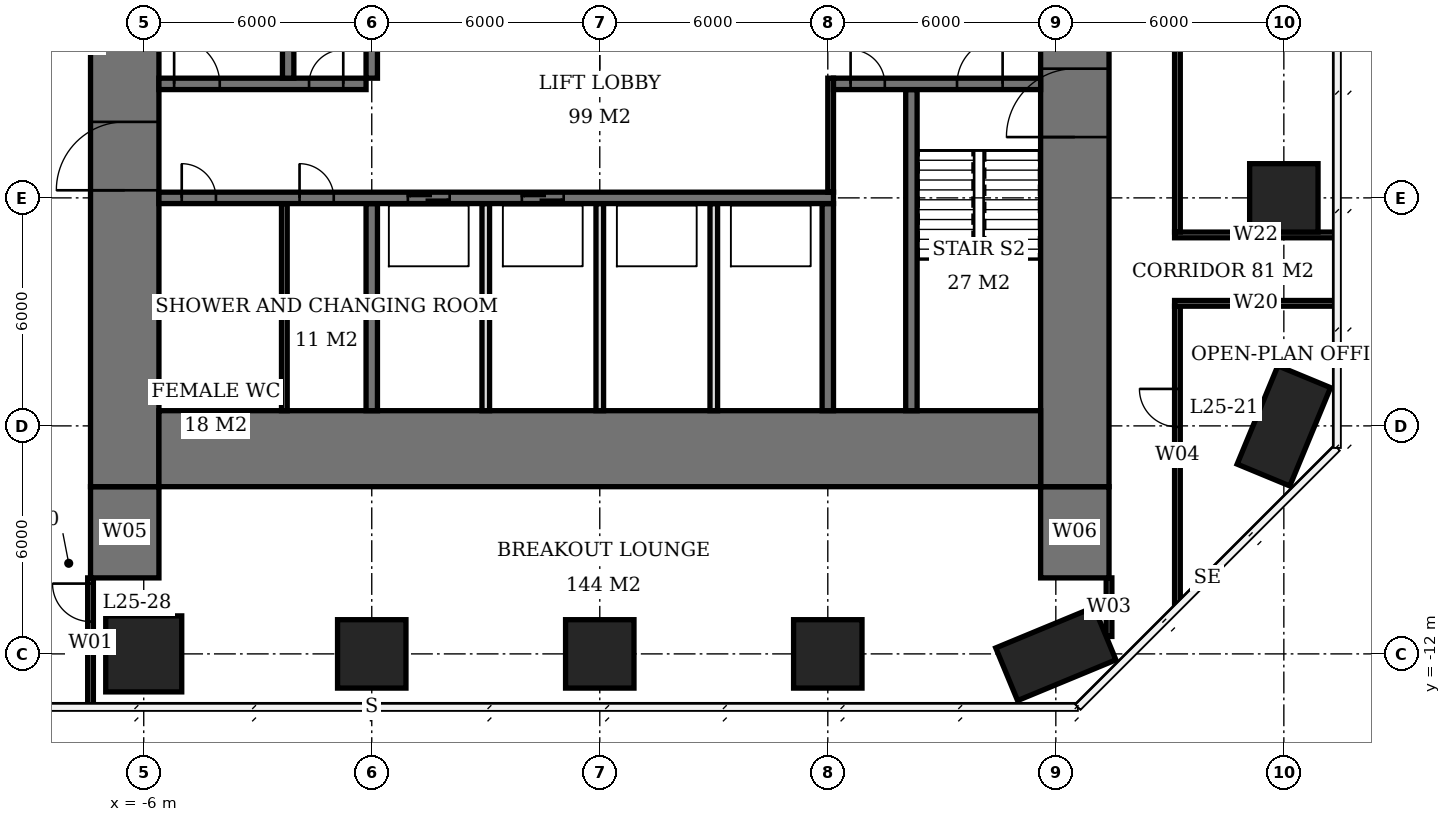
"""IFC4 building model, lengths in metres.
Left out: names, types, materials, properties, quantities, classifications, styles, units other than length and angle.
Written with IfcOpenShell. Run it as: python <this file> out.ifc"""

import sys

from ifc_helpers import new_model, si_unit, direction, frame, frame_2d, origin, origin_2d, place, context, subcontext, project, spatial, rectangle, extrude, element, fill, save


model = new_model("IFC4")
c1 = context("Model", 3, precision=1e-05, world=origin(), true_north=direction((0.0, 1.0)))
c2 = subcontext(c1, "Body", "Model", "MODEL_VIEW")
j1 = project(units=[si_unit("LENGTHUNIT", "METRE"), si_unit("PLANEANGLEUNIT", "RADIAN")], contexts=[c1])
p1 = place(None, origin())
s1 = spatial("IfcSite", under=j1, at=p1, CompositionType="ELEMENT")
p2 = place(p1, origin())
s2 = spatial("IfcBuilding", under=s1, at=p2, CompositionType="ELEMENT")
p3 = place(p2, frame((0.0, 0.0, 105.5)))
s3 = spatial("IfcBuildingStorey", under=s2, at=p3, CompositionType="ELEMENT", Elevation=105.5)
p4 = place(p3, frame((-6.0, -12.0, 0.0), z_axis=(0.0, 0.0, 1.0), x_axis=(1.0, 0.0, 0.0)))
e1 = element("IfcColumn", 1, at=p4, inside=s3, PredefinedType="COLUMN", context=c2, shape_type="SweptSolid", body=[
    extrude(rectangle(XDim=2.0, YDim=2.0, at=origin_2d()), origin(), (0.0, 0.0, 1.0), 3.9),
])
for number, where, z_axis, x_axis in (
    (2, (0.0, -12.0, 0.0), (0.0, 0.0, 1.0), (1.0, 0.0, 0.0)),
    (3, (6.0, -12.0, 0.0), (0.0, 0.0, 1.0), (1.0, 0.0, 0.0)),
    (4, (12.0, -12.0, 0.0), (0.0, 0.0, 1.0), (1.0, 0.0, 0.0)),
):
    element("IfcColumn", number, at=place(p3, frame(where, z_axis=z_axis, x_axis=x_axis)), inside=s3, PredefinedType="COLUMN", context=c2, shape_type="SweptSolid", body=[
        extrude(rectangle(XDim=1.8, YDim=1.8, at=origin_2d()), origin(), (0.0, 0.0, 1.0), 3.9),
    ])
for number, where, z_axis, x_axis in (
    (5, (18.0, -12.0, 0.0), (0.0, 0.0, 1.0), (-0.924, -0.383, 0.0)),
    (6, (24.0, -6.0, 0.0), (0.0, 0.0, 1.0), (-0.383, -0.924, 0.0)),
):
    element("IfcColumn", number, at=place(p3, frame(where, z_axis=z_axis, x_axis=x_axis)), inside=s3, PredefinedType="COLUMN", context=c2, shape_type="SweptSolid", body=[
        extrude(rectangle(XDim=2.8, YDim=1.5, at=origin_2d()), origin(), (0.0, 0.0, 1.0), 3.9),
    ])
p5 = place(p3, frame((24.0, 0.0, 0.0), z_axis=(0.0, 0.0, 1.0), x_axis=(1.0, 0.0, 0.0)))
e7 = element("IfcColumn", 7, at=p5, inside=s3, PredefinedType="COLUMN", context=c2, shape_type="SweptSolid", body=[
    extrude(rectangle(XDim=1.8, YDim=1.8, at=origin_2d()), origin(), (0.0, 0.0, 1.0), 3.9),
])
p6 = place(p3, frame((-5.6, -6.6, 0.0), z_axis=(0.0, 0.0, 1.0), x_axis=(1.0, 0.0, 0.0)))
e8 = element("IfcWall", 8, at=p6, inside=s3, PredefinedType="SHEAR", context=c2, shape_type="SweptSolid", body=[
    extrude(rectangle(XDim=23.2, YDim=2.0, at=frame_2d((11.6, 0.0))), origin(), (0.0, 0.0, 1.0), 3.9),
])
p7 = place(p3, frame((-6.5, -7.6, 0.0), z_axis=(0.0, 0.0, 1.0), x_axis=(0.0, 1.0, 0.0)))
e9 = element("IfcWall", 9, at=p7, inside=s3, PredefinedType="SHEAR", context=c2, shape_type="SweptSolid", body=[
    extrude(rectangle(XDim=21.2, YDim=1.8, at=frame_2d((10.6, 0.0))), origin(), (0.0, 0.0, 1.0), 3.9),
])
p8 = place(p7, frame((7.8, 0.0, 0.0)))
e10 = element("IfcOpeningElement", 10, at=p8, cuts=e9, PredefinedType="OPENING", context=c2, shape_type="SweptSolid", body=[
    extrude(rectangle(XDim=1.8, YDim=2.4, at=frame_2d((0.9, 1.2))), frame((0.0, 0.91, 0.0), z_axis=(0.0, -1.0, 0.0), x_axis=(1.0, 0.0, 0.0)), (0.0, 0.0, 1.0), 1.82),
])
p9 = place(p3, frame((18.5, -7.6, 0.0), z_axis=(0.0, 0.0, 1.0), x_axis=(0.0, 1.0, 0.0)))
e11 = element("IfcWall", 11, at=p9, inside=s3, PredefinedType="SHEAR", context=c2, shape_type="SweptSolid", body=[
    extrude(rectangle(XDim=21.2, YDim=1.8, at=frame_2d((10.6, 0.0))), origin(), (0.0, 0.0, 1.0), 3.9),
])
p10 = place(p9, frame((9.2, 0.0, 0.0)))
e12 = element("IfcOpeningElement", 12, at=p10, cuts=e11, PredefinedType="OPENING", context=c2, shape_type="SweptSolid", body=[
    extrude(rectangle(XDim=1.8, YDim=2.4, at=frame_2d((0.9, 1.2))), frame((0.0, 0.91, 0.0), z_axis=(0.0, -1.0, 0.0), x_axis=(1.0, 0.0, 0.0)), (0.0, 0.0, 1.0), 1.82),
])
for number, where, z_axis, x_axis in (
    (13, (-6.5, -10.0, 0.0), (0.0, 0.0, 1.0), (0.0, 1.0, 0.0)),
    (14, (18.5, -10.0, 0.0), (0.0, 0.0, 1.0), (0.0, 1.0, 0.0)),
):
    element("IfcWall", number, at=place(p3, frame(where, z_axis=z_axis, x_axis=x_axis)), inside=s3, PredefinedType="SHEAR", context=c2, shape_type="SweptSolid", body=[
        extrude(rectangle(XDim=2.4, YDim=1.8, at=frame_2d((1.2, 0.0))), origin(), (0.0, 0.0, 1.0), 3.9),
    ])
p11 = place(p3, frame((-5.6, 0.0, 0.0), z_axis=(0.0, 0.0, 1.0), x_axis=(1.0, 0.0, 0.0)))
e15 = element("IfcWall", 15, at=p11, inside=s3, PredefinedType="SHEAR", context=c2, shape_type="SweptSolid", body=[
    extrude(rectangle(XDim=17.75, YDim=0.3, at=frame_2d((8.875, 0.0))), origin(), (0.0, 0.0, 1.0), 3.9),
])
p12 = place(p11, frame((0.6, 0.0, 0.0)))
e16 = element("IfcOpeningElement", 16, at=p12, cuts=e15, PredefinedType="OPENING", context=c2, shape_type="SweptSolid", body=[
    extrude(rectangle(XDim=0.9, YDim=2.1, at=frame_2d((0.45, 1.05))), frame((0.0, 0.16, 0.0), z_axis=(0.0, -1.0, 0.0), x_axis=(1.0, 0.0, 0.0)), (0.0, 0.0, 1.0), 0.32),
])
p13 = place(p11, frame((3.7, 0.0, 0.0)))
e17 = element("IfcOpeningElement", 17, at=p13, cuts=e15, PredefinedType="OPENING", context=c2, shape_type="SweptSolid", body=[
    extrude(rectangle(XDim=0.9, YDim=2.1, at=frame_2d((0.45, 1.05))), frame((0.0, 0.16, 0.0), z_axis=(0.0, -1.0, 0.0), x_axis=(1.0, 0.0, 0.0)), (0.0, 0.0, 1.0), 0.32),
])
p14 = place(p11, frame((6.55, 0.0, 0.0)))
e18 = element("IfcOpeningElement", 18, at=p14, cuts=e15, PredefinedType="OPENING", context=c2, shape_type="SweptSolid", body=[
    extrude(rectangle(XDim=1.1, YDim=2.1, at=frame_2d((0.55, 1.05))), frame((0.0, 0.16, 0.0), z_axis=(0.0, -1.0, 0.0), x_axis=(1.0, 0.0, 0.0)), (0.0, 0.0, 1.0), 0.32),
])
p15 = place(p11, frame((9.55, 0.0, 0.0)))
e19 = element("IfcOpeningElement", 19, at=p15, cuts=e15, PredefinedType="OPENING", context=c2, shape_type="SweptSolid", body=[
    extrude(rectangle(XDim=1.1, YDim=2.1, at=frame_2d((0.55, 1.05))), frame((0.0, 0.16, 0.0), z_axis=(0.0, -1.0, 0.0), x_axis=(1.0, 0.0, 0.0)), (0.0, 0.0, 1.0), 0.32),
])
p16 = place(p3, frame((-5.6, 3.0, 0.0), z_axis=(0.0, 0.0, 1.0), x_axis=(1.0, 0.0, 0.0)))
e20 = element("IfcWall", 20, at=p16, inside=s3, PredefinedType="SHEAR", context=c2, shape_type="SweptSolid", body=[
    extrude(rectangle(XDim=5.45, YDim=0.3, at=frame_2d((2.725, 0.0))), origin(), (0.0, 0.0, 1.0), 3.9),
])
p17 = place(p16, frame((0.4, 0.0, 0.0)))
e21 = element("IfcOpeningElement", 21, at=p17, cuts=e20, PredefinedType="OPENING", context=c2, shape_type="SweptSolid", body=[
    extrude(rectangle(XDim=1.2, YDim=2.1, at=frame_2d((0.6, 1.05))), frame((0.0, 0.16, 0.0), z_axis=(0.0, -1.0, 0.0), x_axis=(1.0, 0.0, 0.0)), (0.0, 0.0, 1.0), 0.32),
])
p18 = place(p16, frame((3.95, 0.0, 0.0)))
e22 = element("IfcOpeningElement", 22, at=p18, cuts=e20, PredefinedType="OPENING", context=c2, shape_type="SweptSolid", body=[
    extrude(rectangle(XDim=0.9, YDim=2.1, at=frame_2d((0.45, 1.05))), frame((0.0, 0.16, 0.0), z_axis=(0.0, -1.0, 0.0), x_axis=(1.0, 0.0, 0.0)), (0.0, 0.0, 1.0), 0.32),
])
p19 = place(p3, frame((12.15, 3.0, 0.0), z_axis=(0.0, 0.0, 1.0), x_axis=(1.0, 0.0, 0.0)))
e23 = element("IfcWall", 23, at=p19, inside=s3, PredefinedType="SHEAR", context=c2, shape_type="SweptSolid", body=[
    extrude(rectangle(XDim=5.45, YDim=0.3, at=frame_2d((2.725, 0.0))), origin(), (0.0, 0.0, 1.0), 3.9),
])
p20 = place(p19, frame((3.25, 0.0, 0.0)))
e24 = element("IfcOpeningElement", 24, at=p20, cuts=e23, PredefinedType="OPENING", context=c2, shape_type="SweptSolid", body=[
    extrude(rectangle(XDim=1.2, YDim=2.1, at=frame_2d((0.6, 1.05))), frame((0.0, 0.16, 0.0), z_axis=(0.0, -1.0, 0.0), x_axis=(1.0, 0.0, 0.0)), (0.0, 0.0, 1.0), 0.32),
])
p21 = place(p19, frame((0.45, 0.0, 0.0)))
e25 = element("IfcOpeningElement", 25, at=p21, cuts=e23, PredefinedType="OPENING", context=c2, shape_type="SweptSolid", body=[
    extrude(rectangle(XDim=0.9, YDim=2.1, at=frame_2d((0.45, 1.05))), frame((0.0, 0.16, 0.0), z_axis=(0.0, -1.0, 0.0), x_axis=(1.0, 0.0, 0.0)), (0.0, 0.0, 1.0), 0.32),
])
p22 = place(p3, frame((0.0, -5.6, 0.0), z_axis=(0.0, 0.0, 1.0), x_axis=(0.0, 1.0, 0.0)))
e26 = element("IfcWall", 26, at=p22, inside=s3, PredefinedType="SHEAR", context=c2, shape_type="SweptSolid", body=[
    extrude(rectangle(XDim=5.45, YDim=0.3, at=frame_2d((2.725, 0.0))), origin(), (0.0, 0.0, 1.0), 3.9),
])
p23 = place(p3, frame((0.0, 3.15, 0.0), z_axis=(0.0, 0.0, 1.0), x_axis=(0.0, 1.0, 0.0)))
e27 = element("IfcWall", 27, at=p23, inside=s3, PredefinedType="SHEAR", context=c2, shape_type="SweptSolid", body=[
    extrude(rectangle(XDim=8.45, YDim=0.3, at=frame_2d((4.225, 0.0))), origin(), (0.0, 0.0, 1.0), 3.9),
])
p24 = place(p3, frame((12.0, -5.6, 0.0), z_axis=(0.0, 0.0, 1.0), x_axis=(0.0, 1.0, 0.0)))
e28 = element("IfcWall", 28, at=p24, inside=s3, PredefinedType="SHEAR", context=c2, shape_type="SweptSolid", body=[
    extrude(rectangle(XDim=5.45, YDim=0.3, at=frame_2d((2.725, 0.0))), origin(), (0.0, 0.0, 1.0), 3.9),
])
for number, where, z_axis, x_axis in (
    (29, (-2.2, 3.15, 0.0), (0.0, 0.0, 1.0), (0.0, 1.0, 0.0)),
    (30, (14.2, -5.6, 0.0), (0.0, 0.0, 1.0), (0.0, 1.0, 0.0)),
):
    element("IfcWall", number, at=place(p3, frame(where, z_axis=z_axis, x_axis=x_axis)), inside=s3, PredefinedType="SHEAR", context=c2, shape_type="SweptSolid", body=[
        extrude(rectangle(XDim=8.45, YDim=0.3, at=frame_2d((4.225, 0.0))), origin(), (0.0, 0.0, 1.0), 3.9),
    ])
for number, where, z_axis, x_axis in (
    (31, (3.0, -5.6, 0.0), (0.0, 0.0, 1.0), (0.0, 1.0, 0.0)),
    (32, (6.0, -5.6, 0.0), (0.0, 0.0, 1.0), (0.0, 1.0, 0.0)),
    (33, (9.0, -5.6, 0.0), (0.0, 0.0, 1.0), (0.0, 1.0, 0.0)),
):
    element("IfcWall", number, at=place(p3, frame(where, z_axis=z_axis, x_axis=x_axis)), inside=s3, PredefinedType="SOLIDWALL", context=c2, shape_type="SweptSolid", body=[
        extrude(rectangle(XDim=5.45, YDim=0.2, at=frame_2d((2.725, 0.0))), origin(), (0.0, 0.0, 1.0), 3.9),
    ])
p25 = place(p3, frame((-2.3, -5.6, 0.0), z_axis=(0.0, 0.0, 1.0), x_axis=(0.0, 1.0, 0.0)))
e34 = element("IfcWall", 34, at=p25, inside=s3, PredefinedType="PLUMBINGWALL", context=c2, shape_type="SweptSolid", body=[
    extrude(rectangle(XDim=5.45, YDim=0.15, at=frame_2d((2.725, 0.0))), origin(), (0.0, 0.0, 1.0), 3.65),
])
p26 = place(p3, frame((-7.4, -13.4, 0.0), z_axis=(0.0, 0.0, 1.0), x_axis=(0.0, 1.0, 0.0)))
e35 = element("IfcWall", 35, at=p26, inside=s3, PredefinedType="PARTITIONING", context=c2, shape_type="SweptSolid", body=[
    extrude(rectangle(XDim=3.4, YDim=0.15, at=frame_2d((1.7, 0.0))), origin(), (0.0, 0.0, 1.0), 3.65),
])
p27 = place(p26, frame((2.25, 0.0, 0.0)))
e36 = element("IfcOpeningElement", 36, at=p27, cuts=e35, PredefinedType="OPENING", context=c2, shape_type="SweptSolid", body=[
    extrude(rectangle(XDim=1.0, YDim=2.1, at=frame_2d((0.5, 1.05))), frame((0.0, 0.085, 0.0), z_axis=(0.0, -1.0, 0.0), x_axis=(1.0, 0.0, 0.0)), (0.0, 0.0, 1.0), 0.17),
])
p28 = place(p3, frame((19.4, -11.541, 0.0), z_axis=(0.0, 0.0, 1.0), x_axis=(0.0, 1.0, 0.0)))
e37 = element("IfcWall", 37, at=p28, inside=s3, PredefinedType="PARTITIONING", context=c2, shape_type="SweptSolid", body=[
    extrude(rectangle(XDim=1.541, YDim=0.15, at=frame_2d((0.77, 0.0))), origin(), (0.0, 0.0, 1.0), 3.65),
])
p29 = place(p3, frame((21.2, -10.689, 0.0), z_axis=(0.0, 0.0, 1.0), x_axis=(0.0, 1.0, 0.0)))
e38 = element("IfcWall", 38, at=p29, inside=s3, PredefinedType="PARTITIONING", context=c2, shape_type="SweptSolid", body=[
    extrude(rectangle(XDim=7.839, YDim=0.15, at=frame_2d((3.919, 0.0))), origin(), (0.0, 0.0, 1.0), 3.65),
])
p30 = place(p29, frame((4.662, 0.0, 0.0)))
e39 = element("IfcOpeningElement", 39, at=p30, cuts=e38, PredefinedType="OPENING", context=c2, shape_type="SweptSolid", body=[
    extrude(rectangle(XDim=1.0, YDim=2.1, at=frame_2d((0.5, 1.05))), frame((0.0, 0.085, 0.0), z_axis=(0.0, -1.0, 0.0), x_axis=(1.0, 0.0, 0.0)), (0.0, 0.0, 1.0), 0.17),
])
p31 = place(p3, frame((21.125, -2.775, 0.0), z_axis=(0.0, 0.0, 1.0), x_axis=(1.0, 0.0, 0.0)))
e40 = element("IfcWall", 40, at=p31, inside=s3, PredefinedType="PARTITIONING", context=c2, shape_type="SweptSolid", body=[
    extrude(rectangle(XDim=4.275, YDim=0.15, at=frame_2d((2.137, 0.0))), origin(), (0.0, 0.0, 1.0), 3.65),
])
p32 = place(p3, frame((21.2, -0.9, 0.0), z_axis=(0.0, 0.0, 1.0), x_axis=(0.0, 1.0, 0.0)))
e41 = element("IfcWall", 41, at=p32, inside=s3, PredefinedType="PARTITIONING", context=c2, shape_type="SweptSolid", body=[
    extrude(rectangle(XDim=24.19, YDim=0.15, at=frame_2d((12.095, 0.0))), origin(), (0.0, 0.0, 1.0), 3.65),
])
p33 = place(p32, frame((18.674, 0.0, 0.0)))
e42 = element("IfcOpeningElement", 42, at=p33, cuts=e41, PredefinedType="OPENING", context=c2, shape_type="SweptSolid", body=[
    extrude(rectangle(XDim=1.0, YDim=2.1, at=frame_2d((0.5, 1.05))), frame((0.0, 0.085, 0.0), z_axis=(0.0, -1.0, 0.0), x_axis=(1.0, 0.0, 0.0)), (0.0, 0.0, 1.0), 0.17),
])
p34 = place(p3, frame((21.125, -0.975, 0.0), z_axis=(0.0, 0.0, 1.0), x_axis=(1.0, 0.0, 0.0)))
e43 = element("IfcWall", 43, at=p34, inside=s3, PredefinedType="PARTITIONING", context=c2, shape_type="SweptSolid", body=[
    extrude(rectangle(XDim=4.275, YDim=0.15, at=frame_2d((2.137, 0.0))), origin(), (0.0, 0.0, 1.0), 3.65),
])
p35 = place(p3, frame((12.075, 0.15, 0.0), z_axis=(0.0, 0.0, 1.0), x_axis=(0.0, 1.0, 0.0)))
e44 = element("IfcWall", 44, at=p35, inside=s3, PredefinedType="PARTITIONING", context=c2, shape_type="SweptSolid", body=[
    extrude(rectangle(XDim=3.0, YDim=0.15, at=frame_2d((1.5, 0.0))), origin(), (0.0, 0.0, 1.0), 3.65),
])
p36 = place(p8, origin())
e45 = element("IfcDoor", 45, at=p36, inside=s3, OperationType="DOUBLE_DOOR_SINGLE_SWING", PredefinedType="DOOR", context=c2, shape_type="SweptSolid", body=[
    extrude(rectangle(XDim=1.8, YDim=2.4, at=frame_2d((0.9, 1.2))), frame((0.0, 0.025, 0.0), z_axis=(0.0, -1.0, 0.0), x_axis=(1.0, 0.0, 0.0)), (0.0, 0.0, 1.0), 0.05),
])
fill(e10, e45)
p37 = place(p10, origin())
e46 = element("IfcDoor", 46, at=p37, inside=s3, OperationType="DOUBLE_DOOR_SINGLE_SWING", PredefinedType="DOOR", context=c2, shape_type="SweptSolid", body=[
    extrude(rectangle(XDim=1.8, YDim=2.4, at=frame_2d((0.9, 1.2))), frame((0.0, 0.025, 0.0), z_axis=(0.0, -1.0, 0.0), x_axis=(1.0, 0.0, 0.0)), (0.0, 0.0, 1.0), 0.05),
])
fill(e12, e46)
p38 = place(p17, origin())
e47 = element("IfcDoor", 47, at=p38, inside=s3, OperationType="SINGLE_SWING_LEFT", PredefinedType="DOOR", context=c2, shape_type="SweptSolid", body=[
    extrude(rectangle(XDim=1.2, YDim=2.1, at=frame_2d((0.6, 1.05))), frame((0.0, 0.025, 0.0), z_axis=(0.0, -1.0, 0.0), x_axis=(1.0, 0.0, 0.0)), (0.0, 0.0, 1.0), 0.05),
])
fill(e21, e47)
p39 = place(p18, origin())
e48 = element("IfcDoor", 48, at=p39, inside=s3, OperationType="SINGLE_SWING_RIGHT", PredefinedType="DOOR", context=c2, shape_type="SweptSolid", body=[
    extrude(rectangle(XDim=0.9, YDim=2.1, at=frame_2d((0.45, 1.05))), frame((0.0, 0.025, 0.0), z_axis=(0.0, -1.0, 0.0), x_axis=(1.0, 0.0, 0.0)), (0.0, 0.0, 1.0), 0.05),
])
fill(e22, e48)
p40 = place(p20, origin())
e49 = element("IfcDoor", 49, at=p40, inside=s3, OperationType="SINGLE_SWING_RIGHT", PredefinedType="DOOR", context=c2, shape_type="SweptSolid", body=[
    extrude(rectangle(XDim=1.2, YDim=2.1, at=frame_2d((0.6, 1.05))), frame((0.0, 0.025, 0.0), z_axis=(0.0, -1.0, 0.0), x_axis=(1.0, 0.0, 0.0)), (0.0, 0.0, 1.0), 0.05),
])
fill(e24, e49)
p41 = place(p21, origin())
e50 = element("IfcDoor", 50, at=p41, inside=s3, OperationType="SINGLE_SWING_LEFT", PredefinedType="DOOR", context=c2, shape_type="SweptSolid", body=[
    extrude(rectangle(XDim=0.9, YDim=2.1, at=frame_2d((0.45, 1.05))), frame((0.0, 0.025, 0.0), z_axis=(0.0, -1.0, 0.0), x_axis=(1.0, 0.0, 0.0)), (0.0, 0.0, 1.0), 0.05),
])
fill(e25, e50)
p42 = place(p12, origin())
e51 = element("IfcDoor", 51, at=p42, inside=s3, OperationType="SINGLE_SWING_LEFT", PredefinedType="DOOR", context=c2, shape_type="SweptSolid", body=[
    extrude(rectangle(XDim=0.9, YDim=2.1, at=frame_2d((0.45, 1.05))), frame((0.0, 0.025, 0.0), z_axis=(0.0, -1.0, 0.0), x_axis=(1.0, 0.0, 0.0)), (0.0, 0.0, 1.0), 0.05),
])
fill(e16, e51)
p43 = place(p13, origin())
e52 = element("IfcDoor", 52, at=p43, inside=s3, OperationType="SINGLE_SWING_LEFT", PredefinedType="DOOR", context=c2, shape_type="SweptSolid", body=[
    extrude(rectangle(XDim=0.9, YDim=2.1, at=frame_2d((0.45, 1.05))), frame((0.0, 0.025, 0.0), z_axis=(0.0, -1.0, 0.0), x_axis=(1.0, 0.0, 0.0)), (0.0, 0.0, 1.0), 0.05),
])
fill(e17, e52)
p44 = place(p14, origin())
e53 = element("IfcDoor", 53, at=p44, inside=s3, OperationType="DOUBLE_DOOR_SLIDING", PredefinedType="USERDEFINED", context=c2, shape_type="SweptSolid", body=[
    extrude(rectangle(XDim=1.1, YDim=2.1, at=frame_2d((0.55, 1.05))), frame((0.0, 0.025, 0.0), z_axis=(0.0, -1.0, 0.0), x_axis=(1.0, 0.0, 0.0)), (0.0, 0.0, 1.0), 0.05),
])
fill(e18, e53)
p45 = place(p15, origin())
e54 = element("IfcDoor", 54, at=p45, inside=s3, OperationType="DOUBLE_DOOR_SLIDING", PredefinedType="USERDEFINED", context=c2, shape_type="SweptSolid", body=[
    extrude(rectangle(XDim=1.1, YDim=2.1, at=frame_2d((0.55, 1.05))), frame((0.0, 0.025, 0.0), z_axis=(0.0, -1.0, 0.0), x_axis=(1.0, 0.0, 0.0)), (0.0, 0.0, 1.0), 0.05),
])
fill(e19, e54)
p46 = place(p30, origin())
e55 = element("IfcDoor", 55, at=p46, inside=s3, OperationType="SINGLE_SWING_RIGHT", PredefinedType="DOOR", context=c2, shape_type="SweptSolid", body=[
    extrude(rectangle(XDim=1.0, YDim=2.1, at=frame_2d((0.5, 1.05))), frame((0.0, 0.025, 0.0), z_axis=(0.0, -1.0, 0.0), x_axis=(1.0, 0.0, 0.0)), (0.0, 0.0, 1.0), 0.05),
])
fill(e39, e55)
p47 = place(p27, origin())
e56 = element("IfcDoor", 56, at=p47, inside=s3, OperationType="SINGLE_SWING_RIGHT", PredefinedType="DOOR", context=c2, shape_type="SweptSolid", body=[
    extrude(rectangle(XDim=1.0, YDim=2.1, at=frame_2d((0.5, 1.05))), frame((0.0, 0.025, 0.0), z_axis=(0.0, -1.0, 0.0), x_axis=(1.0, 0.0, 0.0)), (0.0, 0.0, 1.0), 0.05),
])
fill(e36, e56)
save(model, sys.argv[1])
